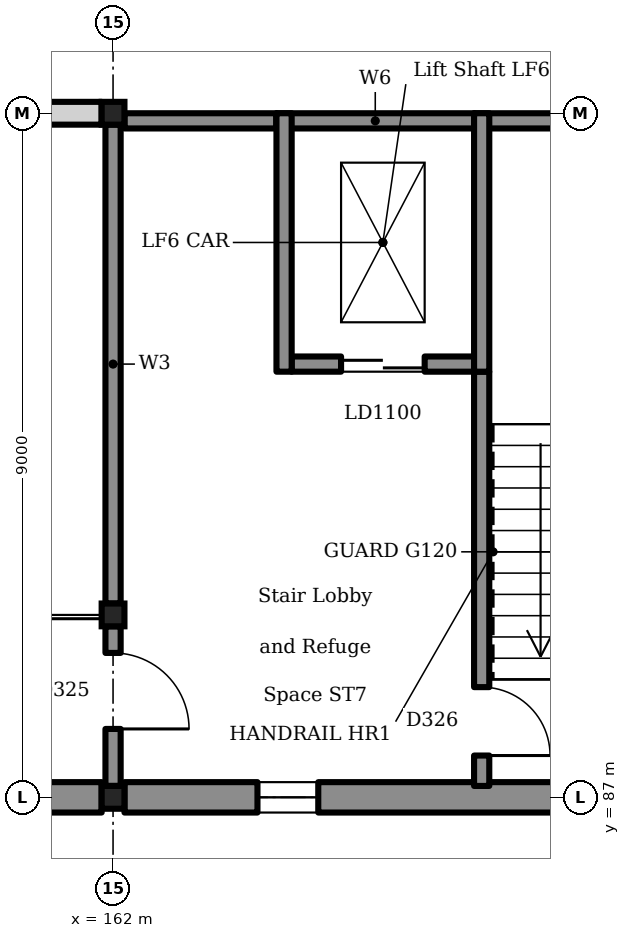
"""IFC4 building model, lengths in metres.
Left out: names, types, materials, properties, quantities, classifications, styles, units other than length and angle.
Written with IfcOpenShell. Run it as: python <this file> out.ifc"""

import sys

from ifc_helpers import new_model, si_unit, direction, frame, frame_2d, origin, origin_2d, place, context, subcontext, project, spatial, rectangle, i_section, extrude, element, fill, save


model = new_model("IFC4")
c1 = context("Model", 3, precision=1e-05, world=origin(), true_north=direction((0.0, 1.0)))
c2 = subcontext(c1, "Body", "Model", "MODEL_VIEW")
j1 = project(units=[si_unit("LENGTHUNIT", "METRE"), si_unit("PLANEANGLEUNIT", "RADIAN")], contexts=[c1])
p1 = place(None, origin())
s1 = spatial("IfcSite", under=j1, at=p1, CompositionType="ELEMENT")
p2 = place(p1, origin())
s2 = spatial("IfcBuilding", under=s1, at=p2, CompositionType="ELEMENT")
p3 = place(p2, frame((0.0, 0.0, 5.4)))
s3 = spatial("IfcBuildingStorey", under=s2, at=p3, CompositionType="ELEMENT", Elevation=5.4)
for number, where, z_axis, x_axis in (
    (1, (162.0, 87.0, 0.0), (0.0, 0.0, 1.0), (1.0, 0.0, 0.0)),
    (2, (162.0, 96.0, 0.0), (0.0, 0.0, 1.0), (1.0, 0.0, 0.0)),
    (3, (162.0, 89.4, 0.0), (0.0, 0.0, 1.0), (1.0, 0.0, 0.0)),
):
    element("IfcColumn", number, at=place(p3, frame(where, z_axis=z_axis, x_axis=x_axis)), inside=s3, PredefinedType="COLUMN", context=c2, shape_type="SweptSolid", body=[
        extrude(i_section(OverallWidth=0.3, OverallDepth=0.3, WebThickness=0.011, FlangeThickness=0.019, FilletRadius=0.027, at=origin_2d()), origin(), (0.0, 0.0, 1.0), 4.5),
    ])
p4 = place(p3, frame((154.15, 87.0, 0.0), z_axis=(0.0, 0.0, 1.0), x_axis=(1.0, 0.0, 0.0)))
e4 = element("IfcWall", 4, at=p4, inside=s3, PredefinedType="SOLIDWALL", context=c2, shape_type="SweptSolid", body=[
    extrude(rectangle(XDim=7.7, YDim=0.4, at=frame_2d((3.85, 0.0))), origin(), (0.0, 0.0, 1.0), 4.25),
])
p5 = place(p4, frame((3.45, 0.0, 0.9)))
e5 = element("IfcOpeningElement", 5, at=p5, cuts=e4, PredefinedType="OPENING", context=c2, shape_type="SweptSolid", body=[
    extrude(rectangle(XDim=0.8, YDim=2.6, at=frame_2d((0.4, 1.3))), frame((0.0, 0.21, 0.0), z_axis=(0.0, -1.0, 0.0), x_axis=(1.0, 0.0, 0.0)), (0.0, 0.0, 1.0), 0.42),
])
p6 = place(p3, frame((162.15, 87.0, 0.0), z_axis=(0.0, 0.0, 1.0), x_axis=(1.0, 0.0, 0.0)))
e6 = element("IfcWall", 6, at=p6, inside=s3, PredefinedType="SOLIDWALL", context=c2, shape_type="SweptSolid", body=[
    extrude(rectangle(XDim=7.7, YDim=0.4, at=frame_2d((3.85, 0.0))), origin(), (0.0, 0.0, 1.0), 4.25),
])
p7 = place(p6, frame((1.75, 0.0, 0.9)))
e7 = element("IfcOpeningElement", 7, at=p7, cuts=e6, PredefinedType="OPENING", context=c2, shape_type="SweptSolid", body=[
    extrude(rectangle(XDim=0.8, YDim=2.6, at=frame_2d((0.4, 1.3))), frame((0.0, 0.21, 0.0), z_axis=(0.0, -1.0, 0.0), x_axis=(1.0, 0.0, 0.0)), (0.0, 0.0, 1.0), 0.42),
])
p8 = place(p3, frame((146.15, 96.0, 1.8), z_axis=(0.0, 0.0, 1.0), x_axis=(1.0, 0.0, 0.0)))
e8 = element("IfcWall", 8, at=p8, inside=s3, PredefinedType="SOLIDWALL", context=c2, shape_type="SweptSolid", body=[
    extrude(rectangle(XDim=15.7, YDim=0.3, at=frame_2d((7.85, 0.0))), origin(), (0.0, 0.0, 1.0), 5.55),
])
p9 = place(p3, frame((162.0, 87.15, 0.0), z_axis=(0.0, 0.0, 1.0), x_axis=(0.0, 1.0, 0.0)))
e9 = element("IfcWall", 9, at=p9, inside=s3, PredefinedType="SOLIDWALL", context=c2, shape_type="SweptSolid", body=[
    extrude(rectangle(XDim=2.1, YDim=0.2, at=frame_2d((1.05, 0.0))), origin(), (0.0, 0.0, 1.0), 4.25),
])
p10 = place(p9, frame((0.75, 0.0, 0.0)))
e10 = element("IfcOpeningElement", 10, at=p10, cuts=e9, PredefinedType="OPENING", context=c2, shape_type="SweptSolid", body=[
    extrude(rectangle(XDim=1.0, YDim=2.1, at=frame_2d((0.5, 1.05))), frame((0.0, 0.11, 0.0), z_axis=(0.0, -1.0, 0.0), x_axis=(1.0, 0.0, 0.0)), (0.0, 0.0, 1.0), 0.22),
])
p11 = place(p3, frame((162.0, 89.55, 0.0), z_axis=(0.0, 0.0, 1.0), x_axis=(0.0, 1.0, 0.0)))
e11 = element("IfcWall", 11, at=p11, inside=s3, PredefinedType="SOLIDWALL", context=c2, shape_type="SweptSolid", body=[
    extrude(rectangle(XDim=6.3, YDim=0.2, at=frame_2d((3.15, 0.0))), origin(), (0.0, 0.0, 1.0), 4.25),
])
p12 = place(p3, frame((162.15, 95.9, 0.0), z_axis=(0.0, 0.0, 1.0), x_axis=(1.0, 0.0, 0.0)))
e12 = element("IfcWall", 12, at=p12, inside=s3, PredefinedType="SOLIDWALL", context=c2, shape_type="SweptSolid", body=[
    extrude(rectangle(XDim=2.0, YDim=0.2, at=frame_2d((1.0, 0.0))), origin(), (0.0, 0.0, 1.0), 4.25),
])
p13 = place(p3, frame((166.75, 95.9, 0.0), z_axis=(0.0, 0.0, 1.0), x_axis=(1.0, 0.0, 0.0)))
e13 = element("IfcWall", 13, at=p13, inside=s3, PredefinedType="SOLIDWALL", context=c2, shape_type="SweptSolid", body=[
    extrude(rectangle(XDim=3.1, YDim=0.2, at=frame_2d((1.55, 0.0))), origin(), (0.0, 0.0, 1.0), 4.25),
])
p14 = place(p3, frame((166.85, 87.15, 0.0), z_axis=(0.0, 0.0, 1.0), x_axis=(0.0, 1.0, 0.0)))
e14 = element("IfcWall", 14, at=p14, inside=s3, PredefinedType="SOLIDWALL", context=c2, shape_type="SweptSolid", body=[
    extrude(rectangle(XDim=5.45, YDim=0.2, at=frame_2d((2.725, 0.0))), origin(), (0.0, 0.0, 1.0), 4.25),
])
p15 = place(p14, frame((0.4, 0.0, 0.0)))
e15 = element("IfcOpeningElement", 15, at=p15, cuts=e14, PredefinedType="OPENING", context=c2, shape_type="SweptSolid", body=[
    extrude(rectangle(XDim=0.9, YDim=2.1, at=frame_2d((0.45, 1.05))), frame((0.0, 0.11, 0.0), z_axis=(0.0, -1.0, 0.0), x_axis=(1.0, 0.0, 0.0)), (0.0, 0.0, 1.0), 0.22),
])
p16 = place(p3, frame((164.15, 95.9, 0.0), z_axis=(0.0, 0.0, 1.0), x_axis=(1.0, 0.0, 0.0)))
e16 = element("IfcWall", 16, at=p16, inside=s3, PredefinedType="SOLIDWALL", context=c2, shape_type="SweptSolid", body=[
    extrude(rectangle(XDim=2.6, YDim=0.2, at=frame_2d((1.3, 0.0))), origin(), (0.0, 0.0, 1.0), 4.5),
])
p17 = place(p3, frame((164.35, 92.7, 0.0), z_axis=(0.0, 0.0, 1.0), x_axis=(1.0, 0.0, 0.0)))
e17 = element("IfcWall", 17, at=p17, inside=s3, PredefinedType="SOLIDWALL", context=c2, shape_type="SweptSolid", body=[
    extrude(rectangle(XDim=2.4, YDim=0.2, at=frame_2d((1.2, 0.0))), origin(), (0.0, 0.0, 1.0), 4.5),
])
p18 = place(p17, frame((0.65, 0.0, 0.0)))
e18 = element("IfcOpeningElement", 18, at=p18, cuts=e17, PredefinedType="OPENING", context=c2, shape_type="SweptSolid", body=[
    extrude(rectangle(XDim=1.1, YDim=2.1, at=frame_2d((0.55, 1.05))), frame((0.0, 0.11, 0.0), z_axis=(0.0, -1.0, 0.0), x_axis=(1.0, 0.0, 0.0)), (0.0, 0.0, 1.0), 0.22),
])
for number, where, z_axis, x_axis in (
    (19, (164.25, 92.6, 0.0), (0.0, 0.0, 1.0), (0.0, 1.0, 0.0)),
    (20, (166.85, 92.6, 0.0), (0.0, 0.0, 1.0), (0.0, 1.0, 0.0)),
):
    element("IfcWall", number, at=place(p3, frame(where, z_axis=z_axis, x_axis=x_axis)), inside=s3, PredefinedType="SOLIDWALL", context=c2, shape_type="SweptSolid", body=[
        extrude(rectangle(XDim=3.4, YDim=0.2, at=frame_2d((1.7, 0.0))), origin(), (0.0, 0.0, 1.0), 4.5),
    ])
p19 = place(p7, origin())
e21 = element("IfcWindow", 21, at=p19, inside=s3, PartitioningType="SINGLE_PANEL", PredefinedType="WINDOW", context=c2, shape_type="SweptSolid", body=[
    extrude(rectangle(XDim=0.8, YDim=2.6, at=frame_2d((0.4, 1.3))), frame((0.0, 0.03, 0.0), z_axis=(0.0, -1.0, 0.0), x_axis=(1.0, 0.0, 0.0)), (0.0, 0.0, 1.0), 0.06),
])
fill(e7, e21)
p20 = place(p18, origin())
e22 = element("IfcDoor", 22, at=p20, inside=s3, OperationType="SLIDING_TO_LEFT", PredefinedType="DOOR", context=c2, shape_type="SweptSolid", body=[
    extrude(rectangle(XDim=1.1, YDim=2.1, at=frame_2d((0.55, 1.05))), frame((0.0, 0.025, 0.0), z_axis=(0.0, -1.0, 0.0), x_axis=(1.0, 0.0, 0.0)), (0.0, 0.0, 1.0), 0.05),
])
fill(e18, e22)
p21 = place(p10, frame((1.0, 0.0, 0.0), z_axis=(0.0, 0.0, 1.0), x_axis=(-1.0, 0.0, 0.0)))
e23 = element("IfcDoor", 23, at=p21, inside=s3, OperationType="SINGLE_SWING_LEFT", PredefinedType="DOOR", context=c2, shape_type="SweptSolid", body=[
    extrude(rectangle(XDim=1.0, YDim=2.1, at=frame_2d((0.5, 1.05))), frame((0.0, 0.025, 0.0), z_axis=(0.0, -1.0, 0.0), x_axis=(1.0, 0.0, 0.0)), (0.0, 0.0, 1.0), 0.05),
])
fill(e10, e23)
p22 = place(p15, frame((0.9, 0.0, 0.0), z_axis=(0.0, 0.0, 1.0), x_axis=(-1.0, 0.0, 0.0)))
e24 = element("IfcDoor", 24, at=p22, inside=s3, OperationType="SINGLE_SWING_LEFT", PredefinedType="DOOR", context=c2, shape_type="SweptSolid", body=[
    extrude(rectangle(XDim=0.9, YDim=2.1, at=frame_2d((0.45, 1.05))), frame((0.0, 0.025, 0.0), z_axis=(0.0, -1.0, 0.0), x_axis=(1.0, 0.0, 0.0)), (0.0, 0.0, 1.0), 0.05),
])
fill(e15, e24)
save(model, sys.argv[1])
